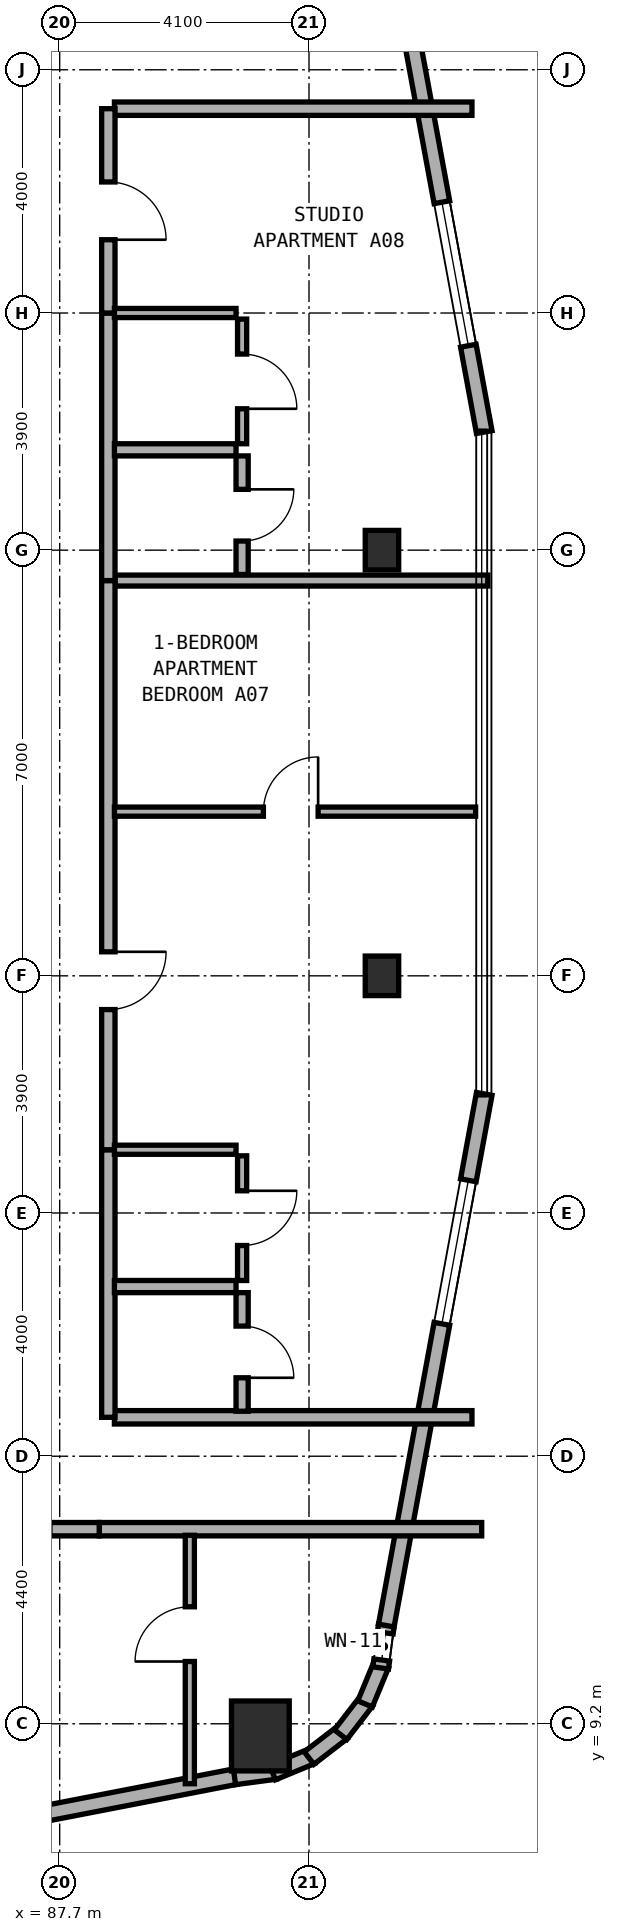
"""IFC4 building model, lengths in metres.
Left out: names, types, materials, properties, quantities, classifications, styles, units other than length and angle.
Written with IfcOpenShell. Run it as: python <this file> out.ifc"""

import sys

from ifc_helpers import new_model, si_unit, direction, frame, frame_2d, origin, origin_2d, place, context, subcontext, project, spatial, rectangle, extrude, element, fill, save


model = new_model("IFC4")
c1 = context("Model", 3, precision=1e-05, world=origin(), true_north=direction((0.0, 1.0)))
c2 = subcontext(c1, "Body", "Model", "MODEL_VIEW")
j1 = project(units=[si_unit("LENGTHUNIT", "METRE"), si_unit("PLANEANGLEUNIT", "RADIAN")], contexts=[c1])
p1 = place(None, origin())
s1 = spatial("IfcSite", under=j1, at=p1, CompositionType="ELEMENT")
p2 = place(p1, origin())
s2 = spatial("IfcBuilding", under=s1, at=p2, CompositionType="ELEMENT")
p3 = place(p2, frame((0.0, 0.0, 112.5)))
s3 = spatial("IfcBuildingStorey", under=s2, at=p3, CompositionType="ELEMENT", Elevation=112.5)
for number, where, z_axis, x_axis in (
    (1, (93.0, 21.5, 0.0), (0.0, 0.0, 1.0), (1.0, 0.0, 0.0)),
    (2, (93.0, 28.5, 0.0), (0.0, 0.0, 1.0), (1.0, 0.0, 0.0)),
):
    element("IfcColumn", number, at=place(p3, frame(where, z_axis=z_axis, x_axis=x_axis)), inside=s3, PredefinedType="COLUMN", context=c2, shape_type="SweptSolid", body=[
        extrude(rectangle(XDim=0.55, YDim=0.65, at=origin_2d()), origin(), (0.0, 0.0, 1.0), 3.5),
    ])
p4 = place(p3, frame((91.0, 9.0, 0.0), z_axis=(0.0, 0.0, 1.0), x_axis=(1.0, 0.0, 0.0)))
e3 = element("IfcColumn", 3, at=p4, inside=s3, PredefinedType="COLUMN", context=c2, shape_type="SweptSolid", body=[
    extrude(rectangle(XDim=0.95, YDim=1.15, at=origin_2d()), origin(), (0.0, 0.0, 1.0), 3.5),
])
p5 = place(p3, frame((82.29, 6.723, 0.0), z_axis=(0.0, 0.0, 1.0), x_axis=(0.981733729692, 0.190260043057, 0.0)))
e4 = element("IfcWall", 4, at=p5, inside=s3, PredefinedType="STANDARD", context=c2, shape_type="SweptSolid", body=[
    extrude(rectangle(XDim=8.447, YDim=0.26, at=frame_2d((4.224, 0.0))), origin(), (0.0, 0.0, 1.0), 3.25),
])
p6 = place(p5, frame((2.608, 0.0, 0.8)))
e5 = element("IfcOpeningElement", 5, at=p6, cuts=e4, PredefinedType="OPENING", context=c2, shape_type="SweptSolid", body=[
    extrude(rectangle(XDim=2.4, YDim=1.6, at=frame_2d((1.2, 0.8))), frame((0.0, 0.14, 0.0), z_axis=(0.0, -1.0, 0.0), x_axis=(1.0, 0.0, 0.0)), (0.0, 0.0, 1.0), 0.28),
])
p7 = place(p3, frame((90.575, 8.328, 0.0), z_axis=(0.0, 0.0, 1.0), x_axis=(0.991300187529, 0.13162043232, 0.0)))
e6 = element("IfcWall", 6, at=p7, inside=s3, PredefinedType="STANDARD", context=c2, shape_type="SweptSolid", body=[
    extrude(rectangle(XDim=0.677, YDim=0.26, at=frame_2d((0.338, 0.0))), origin(), (0.0, 0.0, 1.0), 3.25),
])
for number, where, z_axis, x_axis in (
    (7, (91.2, 8.399, 0.0), (0.0, 0.0, 1.0), (0.924, 0.382, 0.0)),
    (8, (91.801, 8.636, 0.0), (0.0, 0.0, 1.0), (0.793, 0.61, 0.0)),
    (9, (92.32, 9.021, 0.0), (0.0, 0.0, 1.0), (0.609, 0.793, 0.0)),
):
    element("IfcWall", number, at=place(p3, frame(where, z_axis=z_axis, x_axis=x_axis)), inside=s3, PredefinedType="STANDARD", context=c2, shape_type="SweptSolid", body=[
        extrude(rectangle(XDim=0.694, YDim=0.26, at=frame_2d((0.347, 0.0))), origin(), (0.0, 0.0, 1.0), 3.25),
    ])
p8 = place(p3, frame((92.722, 9.527, 0.0), z_axis=(0.0, 0.0, 1.0), x_axis=(0.382289608286, 0.924042561464, 0.0)))
e10 = element("IfcWall", 10, at=p8, inside=s3, PredefinedType="STANDARD", context=c2, shape_type="SweptSolid", body=[
    extrude(rectangle(XDim=0.694, YDim=0.26, at=frame_2d((0.347, 0.0))), origin(), (0.0, 0.0, 1.0), 3.25),
])
p9 = place(p3, frame((92.979, 10.119, 0.0), z_axis=(0.0, 0.0, 1.0), x_axis=(0.130614135366, 0.991433279471, 0.0)))
e11 = element("IfcWall", 11, at=p9, inside=s3, PredefinedType="STANDARD", context=c2, shape_type="SweptSolid", body=[
    extrude(rectangle(XDim=0.712, YDim=0.26, at=frame_2d((0.356, 0.0))), origin(), (0.0, 0.0, 1.0), 3.25),
])
p10 = place(p9, frame((0.131, 0.0, 0.85)))
e12 = element("IfcOpeningElement", 12, at=p10, cuts=e11, PredefinedType="OPENING", context=c2, shape_type="SweptSolid", body=[
    extrude(rectangle(XDim=0.45, YDim=1.5, at=frame_2d((0.225, 0.75))), frame((0.0, 0.14, 0.0), z_axis=(0.0, -1.0, 0.0), x_axis=(1.0, 0.0, 0.0)), (0.0, 0.0, 1.0), 0.28),
])
p11 = place(p3, frame((93.071, 10.816, 0.0), z_axis=(0.0, 0.0, 1.0), x_axis=(0.181209963057, 0.983444431215, 0.0)))
e13 = element("IfcWall", 13, at=p11, inside=s3, PredefinedType="STANDARD", context=c2, shape_type="SweptSolid", body=[
    extrude(rectangle(XDim=8.889, YDim=0.26, at=frame_2d((4.445, 0.0))), origin(), (0.0, 0.0, 1.0), 3.25),
])
p12 = place(p11, frame((5.045, 0.0, 0.8)))
e14 = element("IfcOpeningElement", 14, at=p12, cuts=e13, PredefinedType="OPENING", context=c2, shape_type="SweptSolid", body=[
    extrude(rectangle(XDim=2.4, YDim=1.6, at=frame_2d((1.2, 0.8))), frame((0.0, 0.14, 0.0), z_axis=(0.0, -1.0, 0.0), x_axis=(1.0, 0.0, 0.0)), (0.0, 0.0, 1.0), 0.28),
])
p13 = place(p3, frame((94.682, 30.442, 0.0), z_axis=(0.0, 0.0, 1.0), x_axis=(-0.181209963057, 0.983444431215, 0.0)))
e15 = element("IfcWall", 15, at=p13, inside=s3, PredefinedType="STANDARD", context=c2, shape_type="SweptSolid", body=[
    extrude(rectangle(XDim=8.889, YDim=0.26, at=frame_2d((4.445, 0.0))), origin(), (0.0, 0.0, 1.0), 3.25),
])
p14 = place(p13, frame((1.444, 0.0, 0.8)))
e16 = element("IfcOpeningElement", 16, at=p14, cuts=e15, PredefinedType="OPENING", context=c2, shape_type="SweptSolid", body=[
    extrude(rectangle(XDim=2.4, YDim=1.6, at=frame_2d((1.2, 0.8))), frame((0.0, 0.14, 0.0), z_axis=(0.0, -1.0, 0.0), x_axis=(1.0, 0.0, 0.0)), (0.0, 0.0, 1.0), 0.28),
])
p15 = place(p3, frame((88.35, 12.4, 0.0), z_axis=(0.0, 0.0, 1.0), x_axis=(1.0, 0.0, 0.0)))
e17 = element("IfcWall", 17, at=p15, inside=s3, PredefinedType="SOLIDWALL", context=c2, shape_type="SweptSolid", body=[
    extrude(rectangle(XDim=6.29, YDim=0.22, at=frame_2d((3.145, 0.0))), origin(), (0.0, 0.0, 1.0), 2.945),
])
p16 = place(p3, frame((85.78, 12.4, 0.0), z_axis=(0.0, 0.0, 1.0), x_axis=(1.0, 0.0, 0.0)))
e18 = element("IfcWall", 18, at=p16, inside=s3, PredefinedType="SOLIDWALL", context=c2, shape_type="SweptSolid", body=[
    extrude(rectangle(XDim=2.57, YDim=0.22, at=frame_2d((1.285, 0.0))), origin(), (0.0, 0.0, 1.0), 3.22),
])
p17 = place(p16, frame((0.81, 0.0, 0.0)))
e19 = element("IfcOpeningElement", 19, at=p17, cuts=e18, PredefinedType="OPENING", context=c2, shape_type="SweptSolid", body=[
    extrude(rectangle(XDim=0.95, YDim=2.1, at=frame_2d((0.475, 1.05))), frame((0.0, 0.12, 0.0), z_axis=(0.0, -1.0, 0.0), x_axis=(1.0, 0.0, 0.0)), (0.0, 0.0, 1.0), 0.24),
])
p18 = place(p3, frame((89.84, 8.214, 0.0), z_axis=(0.0, 0.0, 1.0), x_axis=(0.0, 1.0, 0.0)))
e20 = element("IfcWall", 20, at=p18, inside=s3, PredefinedType="PARTITIONING", context=c2, shape_type="SweptSolid", body=[
    extrude(rectangle(XDim=4.086, YDim=0.15, at=frame_2d((2.043, 0.0))), origin(), (0.0, 0.0, 1.0), 2.945),
])
p19 = place(p18, frame((2.01, 0.0, 0.0)))
e21 = element("IfcOpeningElement", 21, at=p19, cuts=e20, PredefinedType="OPENING", context=c2, shape_type="SweptSolid", body=[
    extrude(rectangle(XDim=0.9, YDim=2.1, at=frame_2d((0.45, 1.05))), frame((0.0, 0.085, 0.0), z_axis=(0.0, -1.0, 0.0), x_axis=(1.0, 0.0, 0.0)), (0.0, 0.0, 1.0), 0.17),
])
for number, where, z_axis, x_axis in (
    (22, (88.6, 14.24, 0.0), (0.0, 0.0, 1.0), (1.0, 0.0, 0.0)),
    (23, (88.6, 35.76, 0.0), (0.0, 0.0, 1.0), (1.0, 0.0, 0.0)),
):
    element("IfcWall", number, at=place(p3, frame(where, z_axis=z_axis, x_axis=x_axis)), inside=s3, PredefinedType="SOLIDWALL", context=c2, shape_type="SweptSolid", body=[
        extrude(rectangle(XDim=5.88, YDim=0.22, at=frame_2d((2.94, 0.0))), origin(), (0.0, 0.0, 1.0), 2.945),
    ])
p20 = place(p3, frame((88.5, 28.0, 0.0), z_axis=(0.0, 0.0, 1.0), x_axis=(1.0, 0.0, 0.0)))
e24 = element("IfcWall", 24, at=p20, inside=s3, PredefinedType="SOLIDWALL", context=c2, shape_type="SweptSolid", body=[
    extrude(rectangle(XDim=6.24, YDim=0.18, at=frame_2d((3.12, 0.0))), origin(), (0.0, 0.0, 1.0), 2.945),
])
p21 = place(p3, frame((88.5, 14.24, 0.0), z_axis=(0.0, 0.0, 1.0), x_axis=(0.0, 1.0, 0.0)))
e25 = element("IfcWall", 25, at=p21, inside=s3, PredefinedType="SOLIDWALL", context=c2, shape_type="SweptSolid", body=[
    extrude(rectangle(XDim=4.4, YDim=0.22, at=frame_2d((2.2, 0.0))), origin(), (0.0, 0.0, 1.0), 3.22),
])
p22 = place(p3, frame((88.5, 18.64, 0.0), z_axis=(0.0, 0.0, 1.0), x_axis=(0.0, 1.0, 0.0)))
e26 = element("IfcWall", 26, at=p22, inside=s3, PredefinedType="SOLIDWALL", context=c2, shape_type="SweptSolid", body=[
    extrude(rectangle(XDim=9.36, YDim=0.22, at=frame_2d((4.68, 0.0))), origin(), (0.0, 0.0, 1.0), 2.825),
])
p23 = place(p22, frame((2.305, 0.0, 0.0)))
e27 = element("IfcOpeningElement", 27, at=p23, cuts=e26, PredefinedType="OPENING", context=c2, shape_type="SweptSolid", body=[
    extrude(rectangle(XDim=0.95, YDim=2.1, at=frame_2d((0.475, 1.05))), frame((0.0, 0.12, 0.0), z_axis=(0.0, -1.0, 0.0), x_axis=(1.0, 0.0, 0.0)), (0.0, 0.0, 1.0), 0.24),
])
p24 = place(p3, frame((88.6, 24.2, 0.0), z_axis=(0.0, 0.0, 1.0), x_axis=(1.0, 0.0, 0.0)))
e28 = element("IfcWall", 28, at=p24, inside=s3, PredefinedType="PARTITIONING", context=c2, shape_type="SweptSolid", body=[
    extrude(rectangle(XDim=5.94, YDim=0.15, at=frame_2d((2.97, 0.0))), origin(), (0.0, 0.0, 1.0), 2.945),
])
p25 = place(p24, frame((2.45, 0.0, 0.0)))
e29 = element("IfcOpeningElement", 29, at=p25, cuts=e28, PredefinedType="OPENING", context=c2, shape_type="SweptSolid", body=[
    extrude(rectangle(XDim=0.9, YDim=2.1, at=frame_2d((0.45, 1.05))), frame((0.0, 0.085, 0.0), z_axis=(0.0, -1.0, 0.0), x_axis=(1.0, 0.0, 0.0)), (0.0, 0.0, 1.0), 0.17),
])
p26 = place(p3, frame((88.6, 16.39, 0.0), z_axis=(0.0, 0.0, 1.0), x_axis=(1.0, 0.0, 0.0)))
e30 = element("IfcWall", 30, at=p26, inside=s3, PredefinedType="PLUMBINGWALL", context=c2, shape_type="SweptSolid", body=[
    extrude(rectangle(XDim=2.0, YDim=0.2, at=frame_2d((1.0, 0.0))), origin(), (0.0, 0.0, 1.0), 3.22),
])
p27 = place(p3, frame((88.6, 18.64, 0.0), z_axis=(0.0, 0.0, 1.0), x_axis=(1.0, 0.0, 0.0)))
e31 = element("IfcWall", 31, at=p27, inside=s3, PredefinedType="PARTITIONING", context=c2, shape_type="SweptSolid", body=[
    extrude(rectangle(XDim=2.0, YDim=0.15, at=frame_2d((1.0, 0.0))), origin(), (0.0, 0.0, 1.0), 3.22),
])
p28 = place(p3, frame((90.7, 14.34, 0.0), z_axis=(0.0, 0.0, 1.0), x_axis=(0.0, 1.0, 0.0)))
e32 = element("IfcWall", 32, at=p28, inside=s3, PredefinedType="PLUMBINGWALL", context=c2, shape_type="SweptSolid", body=[
    extrude(rectangle(XDim=1.95, YDim=0.2, at=frame_2d((0.975, 0.0))), origin(), (0.0, 0.0, 1.0), 3.22),
])
p29 = place(p28, frame((0.55, 0.0, 0.0)))
e33 = element("IfcOpeningElement", 33, at=p29, cuts=e32, PredefinedType="OPENING", context=c2, shape_type="SweptSolid", body=[
    extrude(rectangle(XDim=0.85, YDim=2.1, at=frame_2d((0.425, 1.05))), frame((0.0, 0.11, 0.0), z_axis=(0.0, -1.0, 0.0), x_axis=(1.0, 0.0, 0.0)), (0.0, 0.0, 1.0), 0.22),
])
p30 = place(p3, frame((90.7, 16.49, 0.0), z_axis=(0.0, 0.0, 1.0), x_axis=(0.0, 1.0, 0.0)))
e34 = element("IfcWall", 34, at=p30, inside=s3, PredefinedType="PARTITIONING", context=c2, shape_type="SweptSolid", body=[
    extrude(rectangle(XDim=2.05, YDim=0.15, at=frame_2d((1.025, 0.0))), origin(), (0.0, 0.0, 1.0), 3.22),
])
p31 = place(p30, frame((0.575, 0.0, 0.0)))
e35 = element("IfcOpeningElement", 35, at=p31, cuts=e34, PredefinedType="OPENING", context=c2, shape_type="SweptSolid", body=[
    extrude(rectangle(XDim=0.9, YDim=2.1, at=frame_2d((0.45, 1.05))), frame((0.0, 0.085, 0.0), z_axis=(0.0, -1.0, 0.0), x_axis=(1.0, 0.0, 0.0)), (0.0, 0.0, 1.0), 0.17),
])
p32 = place(p3, frame((88.5, 28.0, 0.0), z_axis=(0.0, 0.0, 1.0), x_axis=(0.0, 1.0, 0.0)))
e36 = element("IfcWall", 36, at=p32, inside=s3, PredefinedType="SOLIDWALL", context=c2, shape_type="SweptSolid", body=[
    extrude(rectangle(XDim=4.4, YDim=0.22, at=frame_2d((2.2, 0.0))), origin(), (0.0, 0.0, 1.0), 2.825),
])
p33 = place(p3, frame((88.5, 32.4, 0.0), z_axis=(0.0, 0.0, 1.0), x_axis=(0.0, 1.0, 0.0)))
e37 = element("IfcWall", 37, at=p33, inside=s3, PredefinedType="SOLIDWALL", context=c2, shape_type="SweptSolid", body=[
    extrude(rectangle(XDim=3.36, YDim=0.22, at=frame_2d((1.68, 0.0))), origin(), (0.0, 0.0, 1.0), 3.22),
])
p34 = place(p33, frame((1.205, 0.0, 0.0)))
e38 = element("IfcOpeningElement", 38, at=p34, cuts=e37, PredefinedType="OPENING", context=c2, shape_type="SweptSolid", body=[
    extrude(rectangle(XDim=0.95, YDim=2.1, at=frame_2d((0.475, 1.05))), frame((0.0, 0.12, 0.0), z_axis=(0.0, -1.0, 0.0), x_axis=(1.0, 0.0, 0.0)), (0.0, 0.0, 1.0), 0.24),
])
p35 = place(p3, frame((88.6, 30.15, 0.0), z_axis=(0.0, 0.0, 1.0), x_axis=(1.0, 0.0, 0.0)))
e39 = element("IfcWall", 39, at=p35, inside=s3, PredefinedType="PLUMBINGWALL", context=c2, shape_type="SweptSolid", body=[
    extrude(rectangle(XDim=2.0, YDim=0.2, at=frame_2d((1.0, 0.0))), origin(), (0.0, 0.0, 1.0), 3.22),
])
p36 = place(p3, frame((88.6, 32.4, 0.0), z_axis=(0.0, 0.0, 1.0), x_axis=(1.0, 0.0, 0.0)))
e40 = element("IfcWall", 40, at=p36, inside=s3, PredefinedType="PARTITIONING", context=c2, shape_type="SweptSolid", body=[
    extrude(rectangle(XDim=2.0, YDim=0.15, at=frame_2d((1.0, 0.0))), origin(), (0.0, 0.0, 1.0), 3.22),
])
p37 = place(p3, frame((90.7, 28.1, 0.0), z_axis=(0.0, 0.0, 1.0), x_axis=(0.0, 1.0, 0.0)))
e41 = element("IfcWall", 41, at=p37, inside=s3, PredefinedType="PLUMBINGWALL", context=c2, shape_type="SweptSolid", body=[
    extrude(rectangle(XDim=1.95, YDim=0.2, at=frame_2d((0.975, 0.0))), origin(), (0.0, 0.0, 1.0), 2.825),
])
p38 = place(p37, frame((0.55, 0.0, 0.0)))
e42 = element("IfcOpeningElement", 42, at=p38, cuts=e41, PredefinedType="OPENING", context=c2, shape_type="SweptSolid", body=[
    extrude(rectangle(XDim=0.85, YDim=2.1, at=frame_2d((0.425, 1.05))), frame((0.0, 0.11, 0.0), z_axis=(0.0, -1.0, 0.0), x_axis=(1.0, 0.0, 0.0)), (0.0, 0.0, 1.0), 0.22),
])
p39 = place(p3, frame((90.7, 30.25, 0.0), z_axis=(0.0, 0.0, 1.0), x_axis=(0.0, 1.0, 0.0)))
e43 = element("IfcWall", 43, at=p39, inside=s3, PredefinedType="PARTITIONING", context=c2, shape_type="SweptSolid", body=[
    extrude(rectangle(XDim=2.05, YDim=0.15, at=frame_2d((1.025, 0.0))), origin(), (0.0, 0.0, 1.0), 3.22),
])
p40 = place(p39, frame((0.575, 0.0, 0.0)))
e44 = element("IfcOpeningElement", 44, at=p40, cuts=e43, PredefinedType="OPENING", context=c2, shape_type="SweptSolid", body=[
    extrude(rectangle(XDim=0.9, YDim=2.1, at=frame_2d((0.45, 1.05))), frame((0.0, 0.085, 0.0), z_axis=(0.0, -1.0, 0.0), x_axis=(1.0, 0.0, 0.0)), (0.0, 0.0, 1.0), 0.17),
])
p41 = place(p12, origin())
e45 = element("IfcWindow", 45, at=p41, inside=s3, PartitioningType="SINGLE_PANEL", PredefinedType="WINDOW", context=c2, shape_type="SweptSolid", body=[
    extrude(rectangle(XDim=2.4, YDim=1.6, at=frame_2d((1.2, 0.8))), frame((0.0, 0.03, 0.0), z_axis=(0.0, -1.0, 0.0), x_axis=(1.0, 0.0, 0.0)), (0.0, 0.0, 1.0), 0.06),
])
fill(e14, e45)
p42 = place(p14, origin())
e46 = element("IfcWindow", 46, at=p42, inside=s3, PartitioningType="SINGLE_PANEL", PredefinedType="WINDOW", context=c2, shape_type="SweptSolid", body=[
    extrude(rectangle(XDim=2.4, YDim=1.6, at=frame_2d((1.2, 0.8))), frame((0.0, 0.03, 0.0), z_axis=(0.0, -1.0, 0.0), x_axis=(1.0, 0.0, 0.0)), (0.0, 0.0, 1.0), 0.06),
])
fill(e16, e46)
p43 = place(p10, origin())
e47 = element("IfcWindow", 47, at=p43, inside=s3, PartitioningType="SINGLE_PANEL", PredefinedType="WINDOW", context=c2, shape_type="SweptSolid", body=[
    extrude(rectangle(XDim=0.45, YDim=1.5, at=frame_2d((0.225, 0.75))), frame((0.0, 0.03, 0.0), z_axis=(0.0, -1.0, 0.0), x_axis=(1.0, 0.0, 0.0)), (0.0, 0.0, 1.0), 0.06),
])
fill(e12, e47)
p44 = place(p19, origin())
e48 = element("IfcDoor", 48, at=p44, inside=s3, OperationType="SINGLE_SWING_LEFT", PredefinedType="DOOR", context=c2, shape_type="SweptSolid", body=[
    extrude(rectangle(XDim=0.9, YDim=2.1, at=frame_2d((0.45, 1.05))), frame((0.0, 0.025, 0.0), z_axis=(0.0, -1.0, 0.0), x_axis=(1.0, 0.0, 0.0)), (0.0, 0.0, 1.0), 0.05),
])
fill(e21, e48)
p45 = place(p23, frame((0.95, 0.0, 0.0), z_axis=(0.0, 0.0, 1.0), x_axis=(-1.0, 0.0, 0.0)))
e49 = element("IfcDoor", 49, at=p45, inside=s3, OperationType="SINGLE_SWING_LEFT", PredefinedType="DOOR", context=c2, shape_type="SweptSolid", body=[
    extrude(rectangle(XDim=0.95, YDim=2.1, at=frame_2d((0.475, 1.05))), frame((0.0, 0.025, 0.0), z_axis=(0.0, -1.0, 0.0), x_axis=(1.0, 0.0, 0.0)), (0.0, 0.0, 1.0), 0.05),
])
fill(e27, e49)
p46 = place(p25, origin())
e50 = element("IfcDoor", 50, at=p46, inside=s3, OperationType="SINGLE_SWING_RIGHT", PredefinedType="DOOR", context=c2, shape_type="SweptSolid", body=[
    extrude(rectangle(XDim=0.9, YDim=2.1, at=frame_2d((0.45, 1.05))), frame((0.0, 0.025, 0.0), z_axis=(0.0, -1.0, 0.0), x_axis=(1.0, 0.0, 0.0)), (0.0, 0.0, 1.0), 0.05),
])
fill(e29, e50)
p47 = place(p29, frame((0.85, 0.0, 0.0), z_axis=(0.0, 0.0, 1.0), x_axis=(-1.0, 0.0, 0.0)))
e51 = element("IfcDoor", 51, at=p47, inside=s3, OperationType="SINGLE_SWING_RIGHT", PredefinedType="DOOR", context=c2, shape_type="SweptSolid", body=[
    extrude(rectangle(XDim=0.85, YDim=2.1, at=frame_2d((0.425, 1.05))), frame((0.0, 0.025, 0.0), z_axis=(0.0, -1.0, 0.0), x_axis=(1.0, 0.0, 0.0)), (0.0, 0.0, 1.0), 0.05),
])
fill(e33, e51)
p48 = place(p31, frame((0.9, 0.0, 0.0), z_axis=(0.0, 0.0, 1.0), x_axis=(-1.0, 0.0, 0.0)))
e52 = element("IfcDoor", 52, at=p48, inside=s3, OperationType="SINGLE_SWING_LEFT", PredefinedType="DOOR", context=c2, shape_type="SweptSolid", body=[
    extrude(rectangle(XDim=0.9, YDim=2.1, at=frame_2d((0.45, 1.05))), frame((0.0, 0.025, 0.0), z_axis=(0.0, -1.0, 0.0), x_axis=(1.0, 0.0, 0.0)), (0.0, 0.0, 1.0), 0.05),
])
fill(e35, e52)
p49 = place(p34, frame((0.95, 0.0, 0.0), z_axis=(0.0, 0.0, 1.0), x_axis=(-1.0, 0.0, 0.0)))
e53 = element("IfcDoor", 53, at=p49, inside=s3, OperationType="SINGLE_SWING_RIGHT", PredefinedType="DOOR", context=c2, shape_type="SweptSolid", body=[
    extrude(rectangle(XDim=0.95, YDim=2.1, at=frame_2d((0.475, 1.05))), frame((0.0, 0.025, 0.0), z_axis=(0.0, -1.0, 0.0), x_axis=(1.0, 0.0, 0.0)), (0.0, 0.0, 1.0), 0.05),
])
fill(e38, e53)
p50 = place(p38, frame((0.85, 0.0, 0.0), z_axis=(0.0, 0.0, 1.0), x_axis=(-1.0, 0.0, 0.0)))
e54 = element("IfcDoor", 54, at=p50, inside=s3, OperationType="SINGLE_SWING_LEFT", PredefinedType="DOOR", context=c2, shape_type="SweptSolid", body=[
    extrude(rectangle(XDim=0.85, YDim=2.1, at=frame_2d((0.425, 1.05))), frame((0.0, 0.025, 0.0), z_axis=(0.0, -1.0, 0.0), x_axis=(1.0, 0.0, 0.0)), (0.0, 0.0, 1.0), 0.05),
])
fill(e42, e54)
p51 = place(p40, frame((0.9, 0.0, 0.0), z_axis=(0.0, 0.0, 1.0), x_axis=(-1.0, 0.0, 0.0)))
e55 = element("IfcDoor", 55, at=p51, inside=s3, OperationType="SINGLE_SWING_RIGHT", PredefinedType="DOOR", context=c2, shape_type="SweptSolid", body=[
    extrude(rectangle(XDim=0.9, YDim=2.1, at=frame_2d((0.45, 1.05))), frame((0.0, 0.025, 0.0), z_axis=(0.0, -1.0, 0.0), x_axis=(1.0, 0.0, 0.0)), (0.0, 0.0, 1.0), 0.05),
])
fill(e44, e55)
save(model, sys.argv[1])
